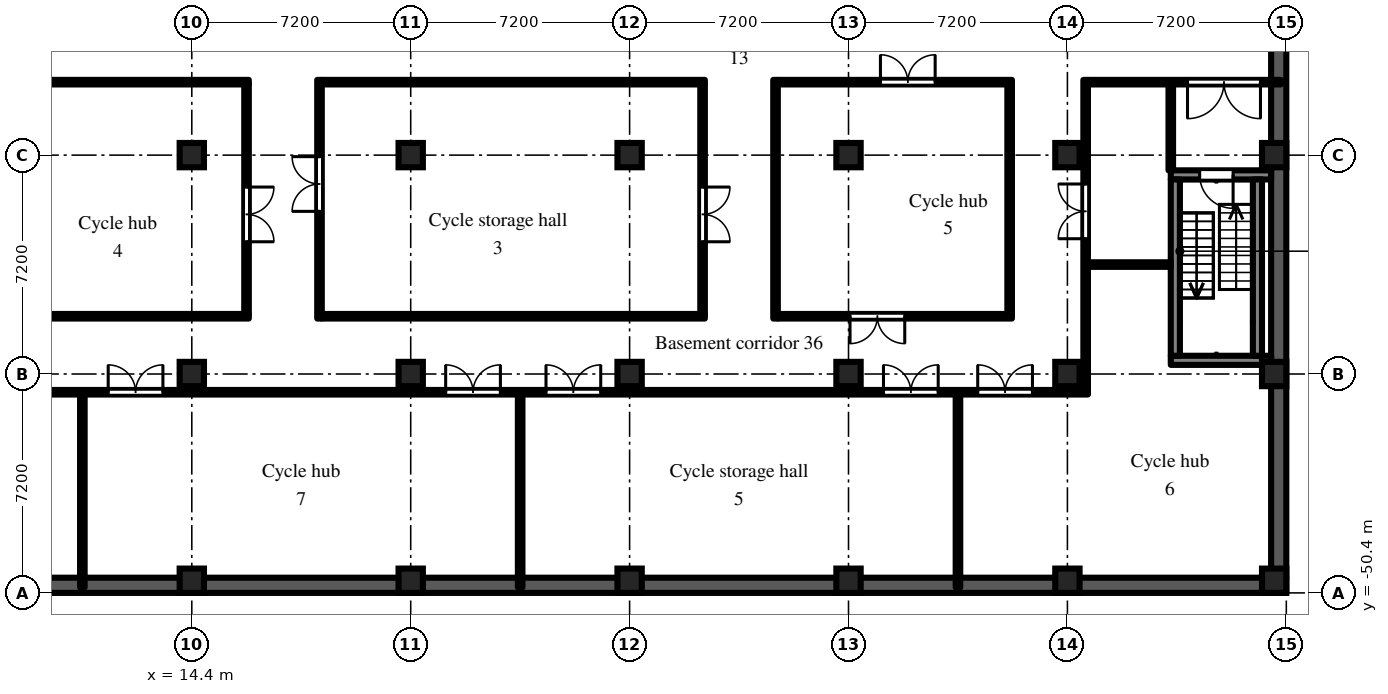
"""IFC4 building model, lengths in metres.
Left out: names, types, materials, properties, quantities, classifications, styles, units other than length and angle.
Written with IfcOpenShell. Run it as: python <this file> out.ifc"""

import sys

from ifc_helpers import new_model, si_unit, direction, frame, frame_2d, origin, origin_2d, place, context, subcontext, project, spatial, rectangle, extrude, element, fill, save


model = new_model("IFC4")
c1 = context("Model", 3, precision=1e-05, world=origin(), true_north=direction((0.0, 1.0)))
c2 = subcontext(c1, "Body", "Model", "MODEL_VIEW")
j1 = project(units=[si_unit("LENGTHUNIT", "METRE"), si_unit("PLANEANGLEUNIT", "RADIAN")], contexts=[c1])
p1 = place(None, origin())
s1 = spatial("IfcSite", under=j1, at=p1, CompositionType="ELEMENT")
p2 = place(p1, origin())
s2 = spatial("IfcBuilding", under=s1, at=p2, CompositionType="ELEMENT")
p3 = place(p2, frame((0.0, 0.0, -4.8)))
s3 = spatial("IfcBuildingStorey", under=s2, at=p3, CompositionType="ELEMENT", Elevation=-4.8)
p4 = place(p3, frame((-50.4, -50.15, -0.5), z_axis=(0.0, 0.0, 1.0), x_axis=(1.0, 0.0, 0.0)))
e1 = element("IfcWall", 1, at=p4, inside=s3, PredefinedType="SOLIDWALL", context=c2, shape_type="SweptSolid", body=[
    extrude(rectangle(XDim=100.8, YDim=0.5, at=frame_2d((50.4, 0.0))), origin(), (0.0, 0.0, 1.0), 5.3),
])
p5 = place(p3, frame((50.15, -49.9, -0.5), z_axis=(0.0, 0.0, 1.0), x_axis=(0.0, 1.0, 0.0)))
e2 = element("IfcWall", 2, at=p5, inside=s3, PredefinedType="SOLIDWALL", context=c2, shape_type="SweptSolid", body=[
    extrude(rectangle(XDim=99.8, YDim=0.5, at=frame_2d((49.9, 0.0))), origin(), (0.0, 0.0, 1.0), 5.3),
])
for number, where, z_axis, x_axis in (
    (3, (14.4, -50.0, -0.5), (0.0, 0.0, 1.0), (1.0, 0.0, 0.0)),
    (4, (14.4, -43.2, -0.5), (0.0, 0.0, 1.0), (1.0, 0.0, 0.0)),
    (5, (14.4, -36.0, -0.5), (0.0, 0.0, 1.0), (1.0, 0.0, 0.0)),
    (6, (21.6, -50.0, -0.5), (0.0, 0.0, 1.0), (1.0, 0.0, 0.0)),
    (7, (21.6, -43.2, -0.5), (0.0, 0.0, 1.0), (1.0, 0.0, 0.0)),
    (8, (21.6, -36.0, -0.5), (0.0, 0.0, 1.0), (1.0, 0.0, 0.0)),
    (9, (28.8, -50.0, -0.5), (0.0, 0.0, 1.0), (1.0, 0.0, 0.0)),
    (10, (28.8, -43.2, -0.5), (0.0, 0.0, 1.0), (1.0, 0.0, 0.0)),
    (11, (28.8, -36.0, -0.5), (0.0, 0.0, 1.0), (1.0, 0.0, 0.0)),
    (12, (36.0, -50.0, -0.5), (0.0, 0.0, 1.0), (1.0, 0.0, 0.0)),
    (13, (36.0, -43.2, -0.5), (0.0, 0.0, 1.0), (1.0, 0.0, 0.0)),
    (14, (36.0, -36.0, -0.5), (0.0, 0.0, 1.0), (1.0, 0.0, 0.0)),
    (15, (43.2, -50.0, -0.5), (0.0, 0.0, 1.0), (1.0, 0.0, 0.0)),
    (16, (43.2, -43.2, -0.5), (0.0, 0.0, 1.0), (1.0, 0.0, 0.0)),
    (17, (43.2, -36.0, -0.5), (0.0, 0.0, 1.0), (1.0, 0.0, 0.0)),
    (18, (50.0, -50.0, -0.5), (0.0, 0.0, 1.0), (1.0, 0.0, 0.0)),
    (19, (50.0, -43.2, -0.5), (0.0, 0.0, 1.0), (1.0, 0.0, 0.0)),
    (20, (50.0, -36.0, -0.5), (0.0, 0.0, 1.0), (1.0, 0.0, 0.0)),
):
    element("IfcColumn", number, at=place(p3, frame(where, z_axis=z_axis, x_axis=x_axis)), inside=s3, PredefinedType="COLUMN", context=c2, shape_type="SweptSolid", body=[
        extrude(rectangle(XDim=0.8, YDim=0.8, at=origin_2d()), origin(), (0.0, 0.0, 1.0), 5.3),
    ])
p6 = place(p3, frame((46.6, -36.65, 0.0), z_axis=(0.0, 0.0, 1.0), x_axis=(1.0, 0.0, 0.0)))
e21 = element("IfcWall", 21, at=p6, inside=s3, PredefinedType="SHEAR", context=c2, shape_type="SweptSolid", body=[
    extrude(rectangle(XDim=3.3, YDim=0.3, at=frame_2d((1.65, 0.0))), origin(), (0.0, 0.0, 1.0), 4.35),
])
p7 = place(p6, frame((0.95, 0.0, 0.0)))
e22 = element("IfcOpeningElement", 22, at=p7, cuts=e21, PredefinedType="OPENING", context=c2, shape_type="SweptSolid", body=[
    extrude(rectangle(XDim=1.1, YDim=2.1, at=frame_2d((0.55, 1.05))), frame((0.0, 0.16, 0.0), z_axis=(0.0, -1.0, 0.0), x_axis=(1.0, 0.0, 0.0)), (0.0, 0.0, 1.0), 0.32),
])
p8 = place(p3, frame((46.6, -42.75, 0.0), z_axis=(0.0, 0.0, 1.0), x_axis=(1.0, 0.0, 0.0)))
e23 = element("IfcWall", 23, at=p8, inside=s3, PredefinedType="SHEAR", context=c2, shape_type="SweptSolid", body=[
    extrude(rectangle(XDim=3.3, YDim=0.3, at=frame_2d((1.65, 0.0))), origin(), (0.0, 0.0, 1.0), 4.35),
])
for number, where, z_axis, x_axis in (
    (24, (46.75, -36.8, 0.0), (0.0, 0.0, 1.0), (0.0, -1.0, 0.0)),
    (25, (49.45, -36.8, 0.0), (0.0, 0.0, 1.0), (0.0, -1.0, 0.0)),
):
    element("IfcWall", number, at=place(p3, frame(where, z_axis=z_axis, x_axis=x_axis)), inside=s3, PredefinedType="SHEAR", context=c2, shape_type="SweptSolid", body=[
        extrude(rectangle(XDim=5.8, YDim=0.3, at=frame_2d((2.9, 0.0))), origin(), (0.0, 0.0, 1.0), 4.35),
    ])
p9 = place(p3, frame((1.275, -33.6, 0.0), z_axis=(0.0, 0.0, 1.0), x_axis=(1.0, 0.0, 0.0)))
e26 = element("IfcWall", 26, at=p9, inside=s3, PredefinedType="PARTITIONING", context=c2, shape_type="SweptSolid", body=[
    extrude(rectangle(XDim=15.0, YDim=0.15, at=frame_2d((7.5, 0.0))), origin(), (0.0, 0.0, 1.0), 4.35),
])
p10 = place(p9, frame((0.775, 0.0, 0.0)))
e27 = element("IfcOpeningElement", 27, at=p10, cuts=e26, PredefinedType="OPENING", context=c2, shape_type="SweptSolid", body=[
    extrude(rectangle(XDim=1.8, YDim=2.1, at=frame_2d((0.9, 1.05))), frame((0.0, 0.085, 0.0), z_axis=(0.0, -1.0, 0.0), x_axis=(1.0, 0.0, 0.0)), (0.0, 0.0, 1.0), 0.17),
])
p11 = place(p3, frame((1.575, -43.8, 0.0), z_axis=(0.0, 0.0, 1.0), x_axis=(1.0, 0.0, 0.0)))
e28 = element("IfcWall", 28, at=p11, inside=s3, PredefinedType="PARTITIONING", context=c2, shape_type="SweptSolid", body=[
    extrude(rectangle(XDim=42.3, YDim=0.15, at=frame_2d((21.15, 0.0))), origin(), (0.0, 0.0, 1.0), 4.35),
])
p12 = place(p11, frame((38.675, 0.0, 0.0)))
e29 = element("IfcOpeningElement", 29, at=p12, cuts=e28, PredefinedType="OPENING", context=c2, shape_type="SweptSolid", body=[
    extrude(rectangle(XDim=1.8, YDim=2.1, at=frame_2d((0.9, 1.05))), frame((0.0, 0.085, 0.0), z_axis=(0.0, -1.0, 0.0), x_axis=(1.0, 0.0, 0.0)), (0.0, 0.0, 1.0), 0.17),
])
p13 = place(p11, frame((2.025, 0.0, 0.0)))
e30 = element("IfcOpeningElement", 30, at=p13, cuts=e28, PredefinedType="OPENING", context=c2, shape_type="SweptSolid", body=[
    extrude(rectangle(XDim=1.8, YDim=2.1, at=frame_2d((0.9, 1.05))), frame((0.0, 0.085, 0.0), z_axis=(0.0, -1.0, 0.0), x_axis=(1.0, 0.0, 0.0)), (0.0, 0.0, 1.0), 0.17),
])
p14 = place(p11, frame((4.025, 0.0, 0.0)))
e31 = element("IfcOpeningElement", 31, at=p14, cuts=e28, PredefinedType="OPENING", context=c2, shape_type="SweptSolid", body=[
    extrude(rectangle(XDim=1.2, YDim=2.1, at=frame_2d((0.6, 1.05))), frame((0.0, 0.085, 0.0), z_axis=(0.0, -1.0, 0.0), x_axis=(1.0, 0.0, 0.0)), (0.0, 0.0, 1.0), 0.17),
])
p15 = place(p11, frame((10.075, 0.0, 0.0)))
e32 = element("IfcOpeningElement", 32, at=p15, cuts=e28, PredefinedType="OPENING", context=c2, shape_type="SweptSolid", body=[
    extrude(rectangle(XDim=1.8, YDim=2.1, at=frame_2d((0.9, 1.05))), frame((0.0, 0.085, 0.0), z_axis=(0.0, -1.0, 0.0), x_axis=(1.0, 0.0, 0.0)), (0.0, 0.0, 1.0), 0.17),
])
p16 = place(p11, frame((21.175, 0.0, 0.0)))
e33 = element("IfcOpeningElement", 33, at=p16, cuts=e28, PredefinedType="OPENING", context=c2, shape_type="SweptSolid", body=[
    extrude(rectangle(XDim=1.8, YDim=2.1, at=frame_2d((0.9, 1.05))), frame((0.0, 0.085, 0.0), z_axis=(0.0, -1.0, 0.0), x_axis=(1.0, 0.0, 0.0)), (0.0, 0.0, 1.0), 0.17),
])
p17 = place(p11, frame((24.475, 0.0, 0.0)))
e34 = element("IfcOpeningElement", 34, at=p17, cuts=e28, PredefinedType="OPENING", context=c2, shape_type="SweptSolid", body=[
    extrude(rectangle(XDim=1.8, YDim=2.1, at=frame_2d((0.9, 1.05))), frame((0.0, 0.085, 0.0), z_axis=(0.0, -1.0, 0.0), x_axis=(1.0, 0.0, 0.0)), (0.0, 0.0, 1.0), 0.17),
])
p18 = place(p11, frame((35.575, 0.0, 0.0)))
e35 = element("IfcOpeningElement", 35, at=p18, cuts=e28, PredefinedType="OPENING", context=c2, shape_type="SweptSolid", body=[
    extrude(rectangle(XDim=1.8, YDim=2.1, at=frame_2d((0.9, 1.05))), frame((0.0, 0.085, 0.0), z_axis=(0.0, -1.0, 0.0), x_axis=(1.0, 0.0, 0.0)), (0.0, 0.0, 1.0), 0.17),
])
p19 = place(p3, frame((1.5, -41.3, 0.0), z_axis=(0.0, 0.0, 1.0), x_axis=(1.0, 0.0, 0.0)))
e36 = element("IfcWall", 36, at=p19, inside=s3, PredefinedType="PARTITIONING", context=c2, shape_type="SweptSolid", body=[
    extrude(rectangle(XDim=14.775, YDim=0.15, at=frame_2d((7.387, 0.0))), origin(), (0.0, 0.0, 1.0), 4.35),
])
p20 = place(p19, frame((2.1, 0.0, 0.0)))
e37 = element("IfcOpeningElement", 37, at=p20, cuts=e36, PredefinedType="OPENING", context=c2, shape_type="SweptSolid", body=[
    extrude(rectangle(XDim=1.8, YDim=2.1, at=frame_2d((0.9, 1.05))), frame((0.0, 0.085, 0.0), z_axis=(0.0, -1.0, 0.0), x_axis=(1.0, 0.0, 0.0)), (0.0, 0.0, 1.0), 0.17),
])
p21 = place(p3, frame((10.8, -50.22, 0.0), z_axis=(0.0, 0.0, 1.0), x_axis=(0.0, 1.0, 0.0)))
e38 = element("IfcWall", 38, at=p21, inside=s3, PredefinedType="PARTITIONING", context=c2, shape_type="SweptSolid", body=[
    extrude(rectangle(XDim=6.345, YDim=0.15, at=frame_2d((3.172, 0.0))), origin(), (0.0, 0.0, 1.0), 4.35),
])
p22 = place(p3, frame((16.2, -41.225, 0.0), z_axis=(0.0, 0.0, 1.0), x_axis=(0.0, 1.0, 0.0)))
e39 = element("IfcWall", 39, at=p22, inside=s3, PredefinedType="PARTITIONING", context=c2, shape_type="SweptSolid", body=[
    extrude(rectangle(XDim=7.55, YDim=0.15, at=frame_2d((3.775, 0.0))), origin(), (0.0, 0.0, 1.0), 4.35),
])
p23 = place(p22, frame((2.375, 0.0, 0.0)))
e40 = element("IfcOpeningElement", 40, at=p23, cuts=e39, PredefinedType="OPENING", context=c2, shape_type="SweptSolid", body=[
    extrude(rectangle(XDim=1.8, YDim=2.1, at=frame_2d((0.9, 1.05))), frame((0.0, 0.085, 0.0), z_axis=(0.0, -1.0, 0.0), x_axis=(1.0, 0.0, 0.0)), (0.0, 0.0, 1.0), 0.17),
])
p24 = place(p3, frame((18.6, -41.375, 0.0), z_axis=(0.0, 0.0, 1.0), x_axis=(0.0, 1.0, 0.0)))
e41 = element("IfcWall", 41, at=p24, inside=s3, PredefinedType="PARTITIONING", context=c2, shape_type="SweptSolid", body=[
    extrude(rectangle(XDim=7.85, YDim=0.15, at=frame_2d((3.925, 0.0))), origin(), (0.0, 0.0, 1.0), 4.35),
])
p25 = place(p24, frame((3.525, 0.0, 0.0)))
e42 = element("IfcOpeningElement", 42, at=p25, cuts=e41, PredefinedType="OPENING", context=c2, shape_type="SweptSolid", body=[
    extrude(rectangle(XDim=1.8, YDim=2.1, at=frame_2d((0.9, 1.05))), frame((0.0, 0.085, 0.0), z_axis=(0.0, -1.0, 0.0), x_axis=(1.0, 0.0, 0.0)), (0.0, 0.0, 1.0), 0.17),
])
for number, where, z_axis, x_axis in (
    (43, (18.675, -41.3, 0.0), (0.0, 0.0, 1.0), (1.0, 0.0, 0.0)),
    (44, (18.675, -33.6, 0.0), (0.0, 0.0, 1.0), (1.0, 0.0, 0.0)),
):
    element("IfcWall", number, at=place(p3, frame(where, z_axis=z_axis, x_axis=x_axis)), inside=s3, PredefinedType="PARTITIONING", context=c2, shape_type="SweptSolid", body=[
        extrude(rectangle(XDim=12.6, YDim=0.15, at=frame_2d((6.3, 0.0))), origin(), (0.0, 0.0, 1.0), 4.35),
    ])
p26 = place(p3, frame((25.2, -50.22, 0.0), z_axis=(0.0, 0.0, 1.0), x_axis=(0.0, 1.0, 0.0)))
e45 = element("IfcWall", 45, at=p26, inside=s3, PredefinedType="PARTITIONING", context=c2, shape_type="SweptSolid", body=[
    extrude(rectangle(XDim=6.345, YDim=0.15, at=frame_2d((3.172, 0.0))), origin(), (0.0, 0.0, 1.0), 4.35),
])
p27 = place(p3, frame((31.2, -41.225, 0.0), z_axis=(0.0, 0.0, 1.0), x_axis=(0.0, 1.0, 0.0)))
e46 = element("IfcWall", 46, at=p27, inside=s3, PredefinedType="PARTITIONING", context=c2, shape_type="SweptSolid", body=[
    extrude(rectangle(XDim=7.55, YDim=0.15, at=frame_2d((3.775, 0.0))), origin(), (0.0, 0.0, 1.0), 4.35),
])
p28 = place(p27, frame((2.375, 0.0, 0.0)))
e47 = element("IfcOpeningElement", 47, at=p28, cuts=e46, PredefinedType="OPENING", context=c2, shape_type="SweptSolid", body=[
    extrude(rectangle(XDim=1.8, YDim=2.1, at=frame_2d((0.9, 1.05))), frame((0.0, 0.085, 0.0), z_axis=(0.0, -1.0, 0.0), x_axis=(1.0, 0.0, 0.0)), (0.0, 0.0, 1.0), 0.17),
])
p29 = place(p3, frame((33.6, -41.375, 0.0), z_axis=(0.0, 0.0, 1.0), x_axis=(0.0, 1.0, 0.0)))
e48 = element("IfcWall", 48, at=p29, inside=s3, PredefinedType="PARTITIONING", context=c2, shape_type="SweptSolid", body=[
    extrude(rectangle(XDim=7.85, YDim=0.15, at=frame_2d((3.925, 0.0))), origin(), (0.0, 0.0, 1.0), 4.35),
])
p30 = place(p3, frame((33.675, -41.3, 0.0), z_axis=(0.0, 0.0, 1.0), x_axis=(1.0, 0.0, 0.0)))
e49 = element("IfcWall", 49, at=p30, inside=s3, PredefinedType="PARTITIONING", context=c2, shape_type="SweptSolid", body=[
    extrude(rectangle(XDim=7.7, YDim=0.15, at=frame_2d((3.85, 0.0))), origin(), (0.0, 0.0, 1.0), 4.35),
])
p31 = place(p30, frame((2.375, 0.0, 0.0)))
e50 = element("IfcOpeningElement", 50, at=p31, cuts=e49, PredefinedType="OPENING", context=c2, shape_type="SweptSolid", body=[
    extrude(rectangle(XDim=1.8, YDim=2.1, at=frame_2d((0.9, 1.05))), frame((0.0, 0.085, 0.0), z_axis=(0.0, -1.0, 0.0), x_axis=(1.0, 0.0, 0.0)), (0.0, 0.0, 1.0), 0.17),
])
p32 = place(p3, frame((33.675, -33.6, 0.0), z_axis=(0.0, 0.0, 1.0), x_axis=(1.0, 0.0, 0.0)))
e51 = element("IfcWall", 51, at=p32, inside=s3, PredefinedType="PARTITIONING", context=c2, shape_type="SweptSolid", body=[
    extrude(rectangle(XDim=7.7, YDim=0.15, at=frame_2d((3.85, 0.0))), origin(), (0.0, 0.0, 1.0), 4.35),
])
p33 = place(p32, frame((3.375, 0.0, 0.0)))
e52 = element("IfcOpeningElement", 52, at=p33, cuts=e51, PredefinedType="OPENING", context=c2, shape_type="SweptSolid", body=[
    extrude(rectangle(XDim=1.8, YDim=2.1, at=frame_2d((0.9, 1.05))), frame((0.0, 0.085, 0.0), z_axis=(0.0, -1.0, 0.0), x_axis=(1.0, 0.0, 0.0)), (0.0, 0.0, 1.0), 0.17),
])
p34 = place(p3, frame((39.6, -50.22, 0.0), z_axis=(0.0, 0.0, 1.0), x_axis=(0.0, 1.0, 0.0)))
e53 = element("IfcWall", 53, at=p34, inside=s3, PredefinedType="PARTITIONING", context=c2, shape_type="SweptSolid", body=[
    extrude(rectangle(XDim=6.345, YDim=0.15, at=frame_2d((3.172, 0.0))), origin(), (0.0, 0.0, 1.0), 4.35),
])
p35 = place(p3, frame((41.3, -41.225, 0.0), z_axis=(0.0, 0.0, 1.0), x_axis=(0.0, 1.0, 0.0)))
e54 = element("IfcWall", 54, at=p35, inside=s3, PredefinedType="PARTITIONING", context=c2, shape_type="SweptSolid", body=[
    extrude(rectangle(XDim=7.55, YDim=0.15, at=frame_2d((3.775, 0.0))), origin(), (0.0, 0.0, 1.0), 4.35),
])
p36 = place(p3, frame((43.8, -43.725, 0.0), z_axis=(0.0, 0.0, 1.0), x_axis=(0.0, 1.0, 0.0)))
e55 = element("IfcWall", 55, at=p36, inside=s3, PredefinedType="PARTITIONING", context=c2, shape_type="SweptSolid", body=[
    extrude(rectangle(XDim=10.2, YDim=0.15, at=frame_2d((5.1, 0.0))), origin(), (0.0, 0.0, 1.0), 4.35),
])
p37 = place(p36, frame((4.975, 0.0, 0.0)))
e56 = element("IfcOpeningElement", 56, at=p37, cuts=e55, PredefinedType="OPENING", context=c2, shape_type="SweptSolid", body=[
    extrude(rectangle(XDim=1.8, YDim=2.1, at=frame_2d((0.9, 1.05))), frame((0.0, 0.085, 0.0), z_axis=(0.0, -1.0, 0.0), x_axis=(1.0, 0.0, 0.0)), (0.0, 0.0, 1.0), 0.17),
])
p38 = place(p3, frame((43.875, -39.6, 0.0), z_axis=(0.0, 0.0, 1.0), x_axis=(1.0, 0.0, 0.0)))
e57 = element("IfcWall", 57, at=p38, inside=s3, PredefinedType="PARTITIONING", context=c2, shape_type="SweptSolid", body=[
    extrude(rectangle(XDim=2.725, YDim=0.15, at=frame_2d((1.363, 0.0))), origin(), (0.0, 0.0, 1.0), 4.35),
])
p39 = place(p3, frame((43.875, -33.6, 0.0), z_axis=(0.0, 0.0, 1.0), x_axis=(1.0, 0.0, 0.0)))
e58 = element("IfcWall", 58, at=p39, inside=s3, PredefinedType="PARTITIONING", context=c2, shape_type="SweptSolid", body=[
    extrude(rectangle(XDim=6.345, YDim=0.15, at=frame_2d((3.172, 0.0))), origin(), (0.0, 0.0, 1.0), 4.35),
])
p40 = place(p39, frame((3.275, 0.0, 0.0)))
e59 = element("IfcOpeningElement", 59, at=p40, cuts=e58, PredefinedType="OPENING", context=c2, shape_type="SweptSolid", body=[
    extrude(rectangle(XDim=2.4, YDim=2.1, at=frame_2d((1.2, 1.05))), frame((0.0, 0.085, 0.0), z_axis=(0.0, -1.0, 0.0), x_axis=(1.0, 0.0, 0.0)), (0.0, 0.0, 1.0), 0.17),
])
p41 = place(p3, frame((46.6, -36.5, 0.0), z_axis=(0.0, 0.0, 1.0), x_axis=(0.0, 1.0, 0.0)))
e60 = element("IfcWall", 60, at=p41, inside=s3, PredefinedType="PARTITIONING", context=c2, shape_type="SweptSolid", body=[
    extrude(rectangle(XDim=2.825, YDim=0.15, at=frame_2d((1.413, 0.0))), origin(), (0.0, 0.0, 1.0), 4.35),
])
p42 = place(p7, frame((1.1, 0.0, 0.0), z_axis=(0.0, 0.0, 1.0), x_axis=(-1.0, 0.0, 0.0)))
e61 = element("IfcDoor", 61, at=p42, inside=s3, OperationType="SINGLE_SWING_LEFT", PredefinedType="DOOR", context=c2, shape_type="SweptSolid", body=[
    extrude(rectangle(XDim=1.1, YDim=2.1, at=frame_2d((0.55, 1.05))), frame((0.0, 0.025, 0.0), z_axis=(0.0, -1.0, 0.0), x_axis=(1.0, 0.0, 0.0)), (0.0, 0.0, 1.0), 0.05),
])
fill(e22, e61)
p43 = place(p23, frame((1.8, 0.0, 0.0), z_axis=(0.0, 0.0, 1.0), x_axis=(-1.0, 0.0, 0.0)))
e62 = element("IfcDoor", 62, at=p43, inside=s3, OperationType="DOUBLE_DOOR_DOUBLE_SWING", PredefinedType="DOOR", context=c2, shape_type="SweptSolid", body=[
    extrude(rectangle(XDim=1.8, YDim=2.1, at=frame_2d((0.9, 1.05))), frame((0.0, 0.025, 0.0), z_axis=(0.0, -1.0, 0.0), x_axis=(1.0, 0.0, 0.0)), (0.0, 0.0, 1.0), 0.05),
])
fill(e40, e62)
p44 = place(p25, origin())
e63 = element("IfcDoor", 63, at=p44, inside=s3, OperationType="DOUBLE_DOOR_DOUBLE_SWING", PredefinedType="DOOR", context=c2, shape_type="SweptSolid", body=[
    extrude(rectangle(XDim=1.8, YDim=2.1, at=frame_2d((0.9, 1.05))), frame((0.0, 0.025, 0.0), z_axis=(0.0, -1.0, 0.0), x_axis=(1.0, 0.0, 0.0)), (0.0, 0.0, 1.0), 0.05),
])
fill(e42, e63)
p45 = place(p28, frame((1.8, 0.0, 0.0), z_axis=(0.0, 0.0, 1.0), x_axis=(-1.0, 0.0, 0.0)))
e64 = element("IfcDoor", 64, at=p45, inside=s3, OperationType="DOUBLE_DOOR_DOUBLE_SWING", PredefinedType="DOOR", context=c2, shape_type="SweptSolid", body=[
    extrude(rectangle(XDim=1.8, YDim=2.1, at=frame_2d((0.9, 1.05))), frame((0.0, 0.025, 0.0), z_axis=(0.0, -1.0, 0.0), x_axis=(1.0, 0.0, 0.0)), (0.0, 0.0, 1.0), 0.05),
])
fill(e47, e64)
p46 = place(p31, frame((1.8, 0.0, 0.0), z_axis=(0.0, 0.0, 1.0), x_axis=(-1.0, 0.0, 0.0)))
e65 = element("IfcDoor", 65, at=p46, inside=s3, OperationType="DOUBLE_DOOR_DOUBLE_SWING", PredefinedType="DOOR", context=c2, shape_type="SweptSolid", body=[
    extrude(rectangle(XDim=1.8, YDim=2.1, at=frame_2d((0.9, 1.05))), frame((0.0, 0.025, 0.0), z_axis=(0.0, -1.0, 0.0), x_axis=(1.0, 0.0, 0.0)), (0.0, 0.0, 1.0), 0.05),
])
fill(e50, e65)
p47 = place(p33, origin())
e66 = element("IfcDoor", 66, at=p47, inside=s3, OperationType="DOUBLE_DOOR_DOUBLE_SWING", PredefinedType="DOOR", context=c2, shape_type="SweptSolid", body=[
    extrude(rectangle(XDim=1.8, YDim=2.1, at=frame_2d((0.9, 1.05))), frame((0.0, 0.025, 0.0), z_axis=(0.0, -1.0, 0.0), x_axis=(1.0, 0.0, 0.0)), (0.0, 0.0, 1.0), 0.05),
])
fill(e52, e66)
p48 = place(p37, origin())
e67 = element("IfcDoor", 67, at=p48, inside=s3, OperationType="DOUBLE_DOOR_DOUBLE_SWING", PredefinedType="DOOR", context=c2, shape_type="SweptSolid", body=[
    extrude(rectangle(XDim=1.8, YDim=2.1, at=frame_2d((0.9, 1.05))), frame((0.0, 0.025, 0.0), z_axis=(0.0, -1.0, 0.0), x_axis=(1.0, 0.0, 0.0)), (0.0, 0.0, 1.0), 0.05),
])
fill(e56, e67)
p49 = place(p12, origin())
e68 = element("IfcDoor", 68, at=p49, inside=s3, OperationType="DOUBLE_DOOR_DOUBLE_SWING", PredefinedType="DOOR", context=c2, shape_type="SweptSolid", body=[
    extrude(rectangle(XDim=1.8, YDim=2.1, at=frame_2d((0.9, 1.05))), frame((0.0, 0.025, 0.0), z_axis=(0.0, -1.0, 0.0), x_axis=(1.0, 0.0, 0.0)), (0.0, 0.0, 1.0), 0.05),
])
fill(e29, e68)
p50 = place(p15, origin())
e69 = element("IfcDoor", 69, at=p50, inside=s3, OperationType="DOUBLE_DOOR_DOUBLE_SWING", PredefinedType="DOOR", context=c2, shape_type="SweptSolid", body=[
    extrude(rectangle(XDim=1.8, YDim=2.1, at=frame_2d((0.9, 1.05))), frame((0.0, 0.025, 0.0), z_axis=(0.0, -1.0, 0.0), x_axis=(1.0, 0.0, 0.0)), (0.0, 0.0, 1.0), 0.05),
])
fill(e32, e69)
p51 = place(p16, origin())
e70 = element("IfcDoor", 70, at=p51, inside=s3, OperationType="DOUBLE_DOOR_DOUBLE_SWING", PredefinedType="DOOR", context=c2, shape_type="SweptSolid", body=[
    extrude(rectangle(XDim=1.8, YDim=2.1, at=frame_2d((0.9, 1.05))), frame((0.0, 0.025, 0.0), z_axis=(0.0, -1.0, 0.0), x_axis=(1.0, 0.0, 0.0)), (0.0, 0.0, 1.0), 0.05),
])
fill(e33, e70)
p52 = place(p17, origin())
e71 = element("IfcDoor", 71, at=p52, inside=s3, OperationType="DOUBLE_DOOR_DOUBLE_SWING", PredefinedType="DOOR", context=c2, shape_type="SweptSolid", body=[
    extrude(rectangle(XDim=1.8, YDim=2.1, at=frame_2d((0.9, 1.05))), frame((0.0, 0.025, 0.0), z_axis=(0.0, -1.0, 0.0), x_axis=(1.0, 0.0, 0.0)), (0.0, 0.0, 1.0), 0.05),
])
fill(e34, e71)
p53 = place(p18, origin())
e72 = element("IfcDoor", 72, at=p53, inside=s3, OperationType="DOUBLE_DOOR_DOUBLE_SWING", PredefinedType="DOOR", context=c2, shape_type="SweptSolid", body=[
    extrude(rectangle(XDim=1.8, YDim=2.1, at=frame_2d((0.9, 1.05))), frame((0.0, 0.025, 0.0), z_axis=(0.0, -1.0, 0.0), x_axis=(1.0, 0.0, 0.0)), (0.0, 0.0, 1.0), 0.05),
])
fill(e35, e72)
p54 = place(p40, frame((2.4, 0.0, 0.0), z_axis=(0.0, 0.0, 1.0), x_axis=(-1.0, 0.0, 0.0)))
e73 = element("IfcDoor", 73, at=p54, inside=s3, OperationType="DOUBLE_DOOR_DOUBLE_SWING", PredefinedType="DOOR", context=c2, shape_type="SweptSolid", body=[
    extrude(rectangle(XDim=2.4, YDim=2.1, at=frame_2d((1.2, 1.05))), frame((0.0, 0.025, 0.0), z_axis=(0.0, -1.0, 0.0), x_axis=(1.0, 0.0, 0.0)), (0.0, 0.0, 1.0), 0.05),
])
fill(e59, e73)
save(model, sys.argv[1])
